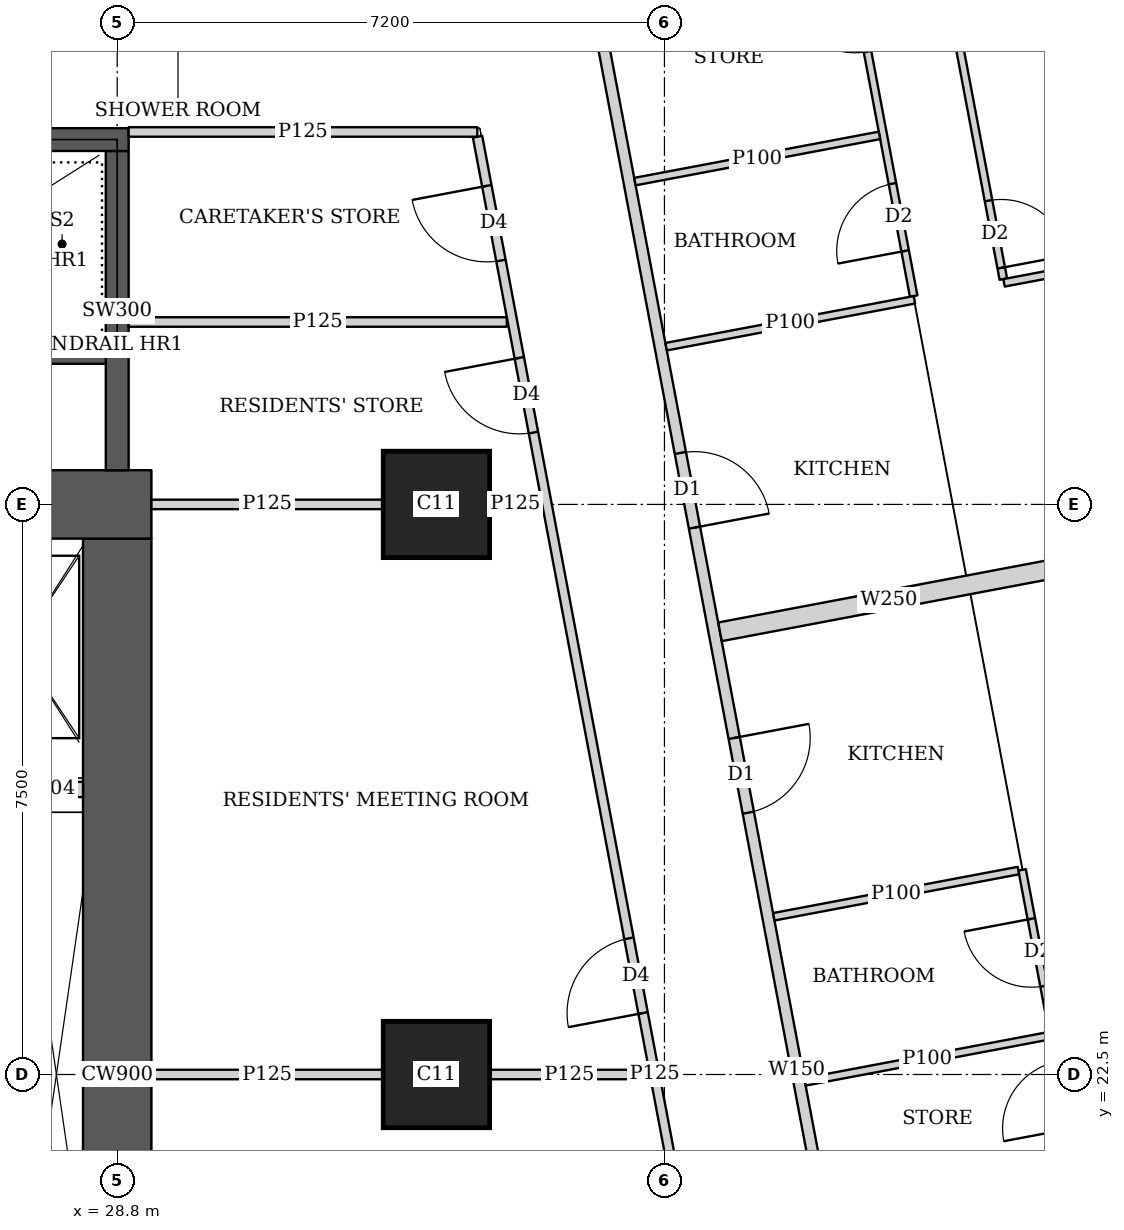
"""IFC4 building model, lengths in metres.
Left out: names, types, materials, properties, quantities, classifications, styles, units other than length and angle.
Written with IfcOpenShell. Run it as: python <this file> out.ifc"""

import sys

from ifc_helpers import new_model, si_unit, direction, frame, frame_2d, origin, origin_2d, place, context, subcontext, project, spatial, rectangle, extrude, element, fill, save


model = new_model("IFC4")
c1 = context("Model", 3, precision=1e-05, world=origin(), true_north=direction((0.0, 1.0)))
c2 = subcontext(c1, "Body", "Model", "MODEL_VIEW")
j1 = project(units=[si_unit("LENGTHUNIT", "METRE"), si_unit("PLANEANGLEUNIT", "RADIAN")], contexts=[c1])
p1 = place(None, origin())
s1 = spatial("IfcSite", under=j1, at=p1, CompositionType="ELEMENT")
p2 = place(p1, origin())
s2 = spatial("IfcBuilding", under=s1, at=p2, CompositionType="ELEMENT")
p3 = place(p2, frame((0.0, 0.0, 234.95)))
s3 = spatial("IfcBuildingStorey", under=s2, at=p3, CompositionType="ELEMENT", Elevation=234.95)
for number, where, z_axis, x_axis in (
    (1, (33.0, 22.5, 0.0), (0.0, 0.0, 1.0), (1.0, 0.0, 0.0)),
    (2, (33.0, 30.0, 0.0), (0.0, 0.0, 1.0), (1.0, 0.0, 0.0)),
):
    element("IfcColumn", number, at=place(p3, frame(where, z_axis=z_axis, x_axis=x_axis)), inside=s3, PredefinedType="COLUMN", context=c2, shape_type="SweptSolid", body=[
        extrude(rectangle(XDim=1.4, YDim=1.4, at=origin_2d()), origin(), (0.0, 0.0, 1.0), 3.75),
    ])
p4 = place(p3, frame((13.95, 30.0, 0.0), z_axis=(0.0, 0.0, 1.0), x_axis=(1.0, 0.0, 0.0)))
e3 = element("IfcWall", 3, at=p4, inside=s3, PredefinedType="SHEAR", context=c2, shape_type="SweptSolid", body=[
    extrude(rectangle(XDim=15.3, YDim=0.9, at=frame_2d((7.65, 0.0))), origin(), (0.0, 0.0, 1.0), 3.75),
])
p5 = place(p4, frame((4.45, 0.0, 0.0)))
e4 = element("IfcOpeningElement", 4, at=p5, cuts=e3, PredefinedType="OPENING", context=c2, shape_type="SweptSolid", body=[
    extrude(rectangle(XDim=1.8, YDim=2.1, at=frame_2d((0.9, 1.05))), frame((0.0, 0.46, 0.0), z_axis=(0.0, -1.0, 0.0), x_axis=(1.0, 0.0, 0.0)), (0.0, 0.0, 1.0), 0.92),
])
p6 = place(p4, frame((10.7, 0.0, 0.0)))
e5 = element("IfcOpeningElement", 5, at=p6, cuts=e3, PredefinedType="OPENING", context=c2, shape_type="SweptSolid", body=[
    extrude(rectangle(XDim=1.1, YDim=2.1, at=frame_2d((0.55, 1.05))), frame((0.0, 0.46, 0.0), z_axis=(0.0, -1.0, 0.0), x_axis=(1.0, 0.0, 0.0)), (0.0, 0.0, 1.0), 0.92),
])
p7 = place(p3, frame((28.8, 15.45, 0.0), z_axis=(0.0, 0.0, 1.0), x_axis=(0.0, 1.0, 0.0)))
e6 = element("IfcWall", 6, at=p7, inside=s3, PredefinedType="SHEAR", context=c2, shape_type="SweptSolid", body=[
    extrude(rectangle(XDim=14.1, YDim=0.9, at=frame_2d((7.05, 0.0))), origin(), (0.0, 0.0, 1.0), 3.75),
])
p8 = place(p3, frame((21.45, 34.8, 0.0), z_axis=(0.0, 0.0, 1.0), x_axis=(1.0, 0.0, 0.0)))
e7 = element("IfcWall", 7, at=p8, inside=s3, PredefinedType="SHEAR", context=c2, shape_type="SweptSolid", body=[
    extrude(rectangle(XDim=7.5, YDim=0.3, at=frame_2d((3.75, 0.0))), origin(), (0.0, 0.0, 1.0), 3.75),
])
p9 = place(p8, frame((0.5, 0.0, 0.0)))
e8 = element("IfcOpeningElement", 8, at=p9, cuts=e7, PredefinedType="OPENING", context=c2, shape_type="SweptSolid", body=[
    extrude(rectangle(XDim=1.1, YDim=2.1, at=frame_2d((0.55, 1.05))), frame((0.0, 0.16, 0.0), z_axis=(0.0, -1.0, 0.0), x_axis=(1.0, 0.0, 0.0)), (0.0, 0.0, 1.0), 0.32),
])
p10 = place(p3, frame((28.8, 30.45, 0.0), z_axis=(0.0, 0.0, 1.0), x_axis=(0.0, 1.0, 0.0)))
e9 = element("IfcWall", 9, at=p10, inside=s3, PredefinedType="SHEAR", context=c2, shape_type="SweptSolid", body=[
    extrude(rectangle(XDim=4.2, YDim=0.3, at=frame_2d((2.1, 0.0))), origin(), (0.0, 0.0, 1.0), 3.75),
])
p11 = place(p3, frame((33.933, 42.73, 0.0), z_axis=(0.0, 0.0, 1.0), x_axis=(0.185595417643, -0.982626246825, 0.0)))
e10 = element("IfcWall", 10, at=p11, inside=s3, PredefinedType="SOLIDWALL", context=c2, shape_type="SweptSolid", body=[
    extrude(rectangle(XDim=41.051, YDim=0.15, at=frame_2d((20.525, 0.0))), origin(), (0.0, 0.0, 1.0), 2.5),
])
p12 = place(p11, frame((12.266, 0.0, 0.0)))
e11 = element("IfcOpeningElement", 11, at=p12, cuts=e10, PredefinedType="OPENING", context=c2, shape_type="SweptSolid", body=[
    extrude(rectangle(XDim=1.0, YDim=2.1, at=frame_2d((0.5, 1.05))), frame((0.0, 0.085, 0.0), z_axis=(0.0, -1.0, 0.0), x_axis=(1.0, 0.0, 0.0)), (0.0, 0.0, 1.0), 0.17),
])
p13 = place(p11, frame((16.082, 0.0, 0.0)))
e12 = element("IfcOpeningElement", 12, at=p13, cuts=e10, PredefinedType="OPENING", context=c2, shape_type="SweptSolid", body=[
    extrude(rectangle(XDim=1.0, YDim=2.1, at=frame_2d((0.5, 1.05))), frame((0.0, 0.085, 0.0), z_axis=(0.0, -1.0, 0.0), x_axis=(1.0, 0.0, 0.0)), (0.0, 0.0, 1.0), 0.17),
])
p14 = place(p11, frame((30.862, 0.0, 0.0)))
e13 = element("IfcOpeningElement", 13, at=p14, cuts=e10, PredefinedType="OPENING", context=c2, shape_type="SweptSolid", body=[
    extrude(rectangle(XDim=1.0, YDim=2.1, at=frame_2d((0.5, 1.05))), frame((0.0, 0.085, 0.0), z_axis=(0.0, -1.0, 0.0), x_axis=(1.0, 0.0, 0.0)), (0.0, 0.0, 1.0), 0.17),
])
p15 = place(p3, frame((38.764, 41.941, 0.0), z_axis=(0.0, 0.0, 1.0), x_axis=(0.185548572312, -0.982635093671, 0.0)))
e14 = element("IfcWall", 14, at=p15, inside=s3, PredefinedType="PARTITIONING", context=c2, shape_type="SweptSolid", body=[
    extrude(rectangle(XDim=9.135, YDim=0.1, at=frame_2d((4.568, 0.0))), origin(), (0.0, 0.0, 1.0), 3.5),
])
p16 = place(p15, frame((8.085, 0.0, 0.0)))
e15 = element("IfcOpeningElement", 15, at=p16, cuts=e14, PredefinedType="OPENING", context=c2, shape_type="SweptSolid", body=[
    extrude(rectangle(XDim=0.9, YDim=2.1, at=frame_2d((0.45, 1.05))), frame((0.0, 0.06, 0.0), z_axis=(0.0, -1.0, 0.0), x_axis=(1.0, 0.0, 0.0)), (0.0, 0.0, 1.0), 0.12),
])
p17 = place(p15, frame((3.7, 0.0, 0.0)))
e16 = element("IfcOpeningElement", 16, at=p17, cuts=e14, PredefinedType="OPENING", context=c2, shape_type="SweptSolid", body=[
    extrude(rectangle(XDim=0.9, YDim=2.1, at=frame_2d((0.45, 1.05))), frame((0.0, 0.06, 0.0), z_axis=(0.0, -1.0, 0.0), x_axis=(1.0, 0.0, 0.0)), (0.0, 0.0, 1.0), 0.12),
])
p18 = place(p3, frame((37.473, 42.309, 0.0), z_axis=(0.0, 0.0, 1.0), x_axis=(0.185491912953, -0.982645790827, 0.0)))
e17 = element("IfcWall", 17, at=p18, inside=s3, PredefinedType="PARTITIONING", context=c2, shape_type="SweptSolid", body=[
    extrude(rectangle(XDim=9.737, YDim=0.1, at=frame_2d((4.869, 0.0))), origin(), (0.0, 0.0, 1.0), 3.5),
])
p19 = place(p18, frame((8.232, 0.0, 0.0)))
e18 = element("IfcOpeningElement", 18, at=p19, cuts=e17, PredefinedType="OPENING", context=c2, shape_type="SweptSolid", body=[
    extrude(rectangle(XDim=0.9, YDim=2.1, at=frame_2d((0.45, 1.05))), frame((0.0, 0.06, 0.0), z_axis=(0.0, -1.0, 0.0), x_axis=(1.0, 0.0, 0.0)), (0.0, 0.0, 1.0), 0.12),
])
p20 = place(p18, frame((2.853, 0.0, 0.0)))
e19 = element("IfcOpeningElement", 19, at=p20, cuts=e17, PredefinedType="OPENING", context=c2, shape_type="SweptSolid", body=[
    extrude(rectangle(XDim=0.9, YDim=2.1, at=frame_2d((0.45, 1.05))), frame((0.0, 0.06, 0.0), z_axis=(0.0, -1.0, 0.0), x_axis=(1.0, 0.0, 0.0)), (0.0, 0.0, 1.0), 0.12),
])
p21 = place(p18, frame((5.564, 0.0, 0.0)))
e20 = element("IfcOpeningElement", 20, at=p21, cuts=e17, PredefinedType="OPENING", context=c2, shape_type="SweptSolid", body=[
    extrude(rectangle(XDim=0.9, YDim=2.1, at=frame_2d((0.45, 1.05))), frame((0.0, 0.06, 0.0), z_axis=(0.0, -1.0, 0.0), x_axis=(1.0, 0.0, 0.0)), (0.0, 0.0, 1.0), 0.12),
])
p22 = place(p3, frame((44.693, 33.713, 0.0), z_axis=(0.0, 0.0, 1.0), x_axis=(-0.982633535512, -0.185556823879, 0.0)))
e21 = element("IfcWall", 21, at=p22, inside=s3, PredefinedType="PARTITIONING", context=c2, shape_type="SweptSolid", body=[
    extrude(rectangle(XDim=4.3, YDim=0.1, at=frame_2d((2.15, 0.0))), origin(), (0.0, 0.0, 1.0), 2.05),
])
p23 = place(p3, frame((39.289, 32.692, 0.0), z_axis=(0.0, 0.0, 1.0), x_axis=(-0.982633623707, -0.185556356831, 0.0)))
e22 = element("IfcWall", 22, at=p23, inside=s3, PredefinedType="PARTITIONING", context=c2, shape_type="SweptSolid", body=[
    extrude(rectangle(XDim=3.325, YDim=0.1, at=frame_2d((1.663, 0.0))), origin(), (0.0, 0.0, 1.0), 3.5),
])
p24 = place(p3, frame((38.829, 34.855, 0.0), z_axis=(0.0, 0.0, 1.0), x_axis=(-0.982610347627, -0.185679575441, 0.0)))
e23 = element("IfcWall", 23, at=p24, inside=s3, PredefinedType="PARTITIONING", context=c2, shape_type="SweptSolid", body=[
    extrude(rectangle(XDim=3.274, YDim=0.1, at=frame_2d((1.637, 0.0))), origin(), (0.0, 0.0, 1.0), 3.5),
])
p25 = place(p3, frame((40.706, 25.192, 0.0), z_axis=(0.0, 0.0, 1.0), x_axis=(0.185629824463, -0.982619747547, 0.0)))
e24 = element("IfcWall", 24, at=p25, inside=s3, PredefinedType="PARTITIONING", context=c2, shape_type="SweptSolid", body=[
    extrude(rectangle(XDim=9.659, YDim=0.1, at=frame_2d((4.83, 0.0))), origin(), (0.0, 0.0, 1.0), 2.5),
])
p26 = place(p25, frame((0.655, 0.0, 0.0)))
e25 = element("IfcOpeningElement", 25, at=p26, cuts=e24, PredefinedType="OPENING", context=c2, shape_type="SweptSolid", body=[
    extrude(rectangle(XDim=0.9, YDim=2.1, at=frame_2d((0.45, 1.05))), frame((0.0, 0.06, 0.0), z_axis=(0.0, -1.0, 0.0), x_axis=(1.0, 0.0, 0.0)), (0.0, 0.0, 1.0), 0.12),
])
p27 = place(p25, frame((4.166, 0.0, 0.0)))
e26 = element("IfcOpeningElement", 26, at=p27, cuts=e24, PredefinedType="OPENING", context=c2, shape_type="SweptSolid", body=[
    extrude(rectangle(XDim=0.9, YDim=2.1, at=frame_2d((0.45, 1.05))), frame((0.0, 0.06, 0.0), z_axis=(0.0, -1.0, 0.0), x_axis=(1.0, 0.0, 0.0)), (0.0, 0.0, 1.0), 0.12),
])
p28 = place(p25, frame((2.563, 0.0, 0.0)))
e27 = element("IfcOpeningElement", 27, at=p28, cuts=e24, PredefinedType="OPENING", context=c2, shape_type="SweptSolid", body=[
    extrude(rectangle(XDim=0.9, YDim=2.1, at=frame_2d((0.45, 1.05))), frame((0.0, 0.06, 0.0), z_axis=(0.0, -1.0, 0.0), x_axis=(1.0, 0.0, 0.0)), (0.0, 0.0, 1.0), 0.12),
])
p29 = place(p25, frame((6.074, 0.0, 0.0)))
e28 = element("IfcOpeningElement", 28, at=p29, cuts=e24, PredefinedType="OPENING", context=c2, shape_type="SweptSolid", body=[
    extrude(rectangle(XDim=0.9, YDim=2.1, at=frame_2d((0.45, 1.05))), frame((0.0, 0.06, 0.0), z_axis=(0.0, -1.0, 0.0), x_axis=(1.0, 0.0, 0.0)), (0.0, 0.0, 1.0), 0.12),
])
p30 = place(p3, frame((40.657, 25.183, 0.0), z_axis=(0.0, 0.0, 1.0), x_axis=(-0.982607026909, -0.185697147715, 0.0)))
e29 = element("IfcWall", 29, at=p30, inside=s3, PredefinedType="PARTITIONING", context=c2, shape_type="SweptSolid", body=[
    extrude(rectangle(XDim=3.275, YDim=0.1, at=frame_2d((1.637, 0.0))), origin(), (0.0, 0.0, 1.0), 3.5),
])
p31 = place(p3, frame((41.067, 23.011, 0.0), z_axis=(0.0, 0.0, 1.0), x_axis=(-0.982618057925, -0.185638768151, 0.0)))
e30 = element("IfcWall", 30, at=p31, inside=s3, PredefinedType="PARTITIONING", context=c2, shape_type="SweptSolid", body=[
    extrude(rectangle(XDim=3.275, YDim=0.1, at=frame_2d((1.637, 0.0))), origin(), (0.0, 0.0, 1.0), 2.5),
])
p32 = place(p3, frame((41.177, 29.164, 0.0), z_axis=(0.0, 0.0, 1.0), x_axis=(-0.982612837616, -0.185666398014, 0.0)))
e31 = element("IfcWall", 31, at=p32, inside=s3, PredefinedType="SOLIDWALL", context=c2, shape_type="SweptSolid", body=[
    extrude(rectangle(XDim=4.525, YDim=0.25, at=frame_2d((2.262, 0.0))), origin(), (0.0, 0.0, 1.0), 2.5),
])
p33 = place(p3, frame((28.95, 34.9, 0.0), z_axis=(0.0, 0.0, 1.0), x_axis=(1.0, 0.0, 0.0)))
e32 = element("IfcWall", 32, at=p33, inside=s3, PredefinedType="PARTITIONING", context=c2, shape_type="SweptSolid", body=[
    extrude(rectangle(XDim=4.588, YDim=0.125, at=frame_2d((2.294, 0.0))), origin(), (0.0, 0.0, 1.0), 3.5),
])
p34 = place(p3, frame((38.202, 10.163, 0.0), z_axis=(0.0, 0.0, 1.0), x_axis=(-0.185610321132, 0.982623431783, 0.0)))
e33 = element("IfcWall", 33, at=p34, inside=s3, PredefinedType="PARTITIONING", context=c2, shape_type="SweptSolid", body=[
    extrude(rectangle(XDim=25.111, YDim=0.125, at=frame_2d((12.556, 0.0))), origin(), (0.0, 0.0, 1.0), 2.5),
])
p35 = place(p34, frame((0.708, 0.0, 0.0)))
e34 = element("IfcOpeningElement", 34, at=p35, cuts=e33, PredefinedType="OPENING", context=c2, shape_type="SweptSolid", body=[
    extrude(rectangle(XDim=1.0, YDim=2.1, at=frame_2d((0.5, 1.05))), frame((0.0, 0.073, 0.0), z_axis=(0.0, -1.0, 0.0), x_axis=(1.0, 0.0, 0.0)), (0.0, 0.0, 1.0), 0.145),
])
p36 = place(p34, frame((13.378, 0.0, 0.0)))
e35 = element("IfcOpeningElement", 35, at=p36, cuts=e33, PredefinedType="OPENING", context=c2, shape_type="SweptSolid", body=[
    extrude(rectangle(XDim=1.0, YDim=2.1, at=frame_2d((0.5, 1.05))), frame((0.0, 0.073, 0.0), z_axis=(0.0, -1.0, 0.0), x_axis=(1.0, 0.0, 0.0)), (0.0, 0.0, 1.0), 0.145),
])
p37 = place(p34, frame((21.15, 0.0, 0.0)))
e36 = element("IfcOpeningElement", 36, at=p37, cuts=e33, PredefinedType="OPENING", context=c2, shape_type="SweptSolid", body=[
    extrude(rectangle(XDim=1.0, YDim=2.1, at=frame_2d((0.5, 1.05))), frame((0.0, 0.073, 0.0), z_axis=(0.0, -1.0, 0.0), x_axis=(1.0, 0.0, 0.0)), (0.0, 0.0, 1.0), 0.145),
])
p38 = place(p34, frame((23.453, 0.0, 0.0)))
e37 = element("IfcOpeningElement", 37, at=p38, cuts=e33, PredefinedType="OPENING", context=c2, shape_type="SweptSolid", body=[
    extrude(rectangle(XDim=1.0, YDim=2.1, at=frame_2d((0.5, 1.05))), frame((0.0, 0.073, 0.0), z_axis=(0.0, -1.0, 0.0), x_axis=(1.0, 0.0, 0.0)), (0.0, 0.0, 1.0), 0.145),
])
p39 = place(p3, frame((29.25, 22.5, 0.0), z_axis=(0.0, 0.0, 1.0), x_axis=(1.0, 0.0, 0.0)))
e38 = element("IfcWall", 38, at=p39, inside=s3, PredefinedType="PARTITIONING", context=c2, shape_type="SweptSolid", body=[
    extrude(rectangle(XDim=3.049, YDim=0.125, at=frame_2d((1.524, 0.0))), origin(), (0.0, 0.0, 1.0), 3.5),
])
p40 = place(p3, frame((33.701, 22.5, 0.0), z_axis=(0.0, 0.0, 1.0), x_axis=(1.0, 0.0, 0.0)))
e39 = element("IfcWall", 39, at=p40, inside=s3, PredefinedType="PARTITIONING", context=c2, shape_type="SweptSolid", body=[
    extrude(rectangle(XDim=2.095, YDim=0.125, at=frame_2d((1.047, 0.0))), origin(), (0.0, 0.0, 1.0), 2.5),
])
p41 = place(p3, frame((29.25, 30.0, 0.0), z_axis=(0.0, 0.0, 1.0), x_axis=(1.0, 0.0, 0.0)))
e40 = element("IfcWall", 40, at=p41, inside=s3, PredefinedType="PARTITIONING", context=c2, shape_type="SweptSolid", body=[
    extrude(rectangle(XDim=3.049, YDim=0.125, at=frame_2d((1.524, 0.0))), origin(), (0.0, 0.0, 1.0), 3.5),
])
p42 = place(p3, frame((33.701, 30.0, 0.0), z_axis=(0.0, 0.0, 1.0), x_axis=(1.0, 0.0, 0.0)))
e41 = element("IfcWall", 41, at=p42, inside=s3, PredefinedType="PARTITIONING", context=c2, shape_type="SweptSolid", body=[
    extrude(rectangle(XDim=0.678, YDim=0.125, at=frame_2d((0.339, 0.0))), origin(), (0.0, 0.0, 1.0), 2.5),
])
p43 = place(p3, frame((28.95, 32.4, 0.0), z_axis=(0.0, 0.0, 1.0), x_axis=(1.0, 0.0, 0.0)))
e42 = element("IfcWall", 42, at=p43, inside=s3, PredefinedType="PARTITIONING", context=c2, shape_type="SweptSolid", body=[
    extrude(rectangle(XDim=4.976, YDim=0.125, at=frame_2d((2.488, 0.0))), origin(), (0.0, 0.0, 1.0), 3.5),
])
p44 = place(p3, frame((23.0, 31.95, 0.0), z_axis=(0.0, 0.0, 1.0), x_axis=(1.0, 0.0, 0.0)))
e43 = element("IfcWall", 43, at=p44, inside=s3, PredefinedType="SHEAR", context=c2, shape_type="SweptSolid", body=[
    extrude(rectangle(XDim=5.8, YDim=0.2, at=frame_2d((2.9, 0.0))), origin(), (0.0, 0.0, 1.0), 3.75),
])
p45 = place(p3, frame((27.4, 26.25, 0.0), z_axis=(0.0, 0.0, 1.0), x_axis=(1.0, 0.0, 0.0)))
e44 = element("IfcWall", 44, at=p45, inside=s3, PredefinedType="SOLIDWALL", context=c2, shape_type="SweptSolid", body=[
    extrude(rectangle(XDim=0.95, YDim=0.2, at=frame_2d((0.475, 0.0))), origin(), (0.0, 0.0, 1.0), 3.5),
])
p46 = place(p16, origin())
e45 = element("IfcDoor", 45, at=p46, inside=s3, OperationType="SINGLE_SWING_RIGHT", PredefinedType="DOOR", context=c2, shape_type="SweptSolid", body=[
    extrude(rectangle(XDim=0.9, YDim=2.1, at=frame_2d((0.45, 1.05))), frame((0.0, 0.025, 0.0), z_axis=(0.0, -1.0, 0.0), x_axis=(1.0, 0.0, 0.0)), (0.0, 0.0, 1.0), 0.05),
])
fill(e15, e45)
p47 = place(p19, origin())
e46 = element("IfcDoor", 46, at=p47, inside=s3, OperationType="SINGLE_SWING_LEFT", PredefinedType="DOOR", context=c2, shape_type="SweptSolid", body=[
    extrude(rectangle(XDim=0.9, YDim=2.1, at=frame_2d((0.45, 1.05))), frame((0.0, 0.025, 0.0), z_axis=(0.0, -1.0, 0.0), x_axis=(1.0, 0.0, 0.0)), (0.0, 0.0, 1.0), 0.05),
])
fill(e18, e46)
p48 = place(p12, origin())
e47 = element("IfcDoor", 47, at=p48, inside=s3, OperationType="SINGLE_SWING_RIGHT", PredefinedType="DOOR", context=c2, shape_type="SweptSolid", body=[
    extrude(rectangle(XDim=1.0, YDim=2.1, at=frame_2d((0.5, 1.05))), frame((0.0, 0.025, 0.0), z_axis=(0.0, -1.0, 0.0), x_axis=(1.0, 0.0, 0.0)), (0.0, 0.0, 1.0), 0.05),
])
fill(e11, e47)
p49 = place(p26, origin())
e48 = element("IfcDoor", 48, at=p49, inside=s3, OperationType="SINGLE_SWING_RIGHT", PredefinedType="DOOR", context=c2, shape_type="SweptSolid", body=[
    extrude(rectangle(XDim=0.9, YDim=2.1, at=frame_2d((0.45, 1.05))), frame((0.0, 0.025, 0.0), z_axis=(0.0, -1.0, 0.0), x_axis=(1.0, 0.0, 0.0)), (0.0, 0.0, 1.0), 0.05),
])
fill(e25, e48)
p50 = place(p13, origin())
e49 = element("IfcDoor", 49, at=p50, inside=s3, OperationType="SINGLE_SWING_LEFT", PredefinedType="DOOR", context=c2, shape_type="SweptSolid", body=[
    extrude(rectangle(XDim=1.0, YDim=2.1, at=frame_2d((0.5, 1.05))), frame((0.0, 0.025, 0.0), z_axis=(0.0, -1.0, 0.0), x_axis=(1.0, 0.0, 0.0)), (0.0, 0.0, 1.0), 0.05),
])
fill(e12, e49)
p51 = place(p36, origin())
e50 = element("IfcDoor", 50, at=p51, inside=s3, OperationType="SINGLE_SWING_LEFT", PredefinedType="DOOR", context=c2, shape_type="SweptSolid", body=[
    extrude(rectangle(XDim=1.0, YDim=2.1, at=frame_2d((0.5, 1.05))), frame((0.0, 0.025, 0.0), z_axis=(0.0, -1.0, 0.0), x_axis=(1.0, 0.0, 0.0)), (0.0, 0.0, 1.0), 0.05),
])
fill(e35, e50)
p52 = place(p37, origin())
e51 = element("IfcDoor", 51, at=p52, inside=s3, OperationType="SINGLE_SWING_RIGHT", PredefinedType="DOOR", context=c2, shape_type="SweptSolid", body=[
    extrude(rectangle(XDim=1.0, YDim=2.1, at=frame_2d((0.5, 1.05))), frame((0.0, 0.025, 0.0), z_axis=(0.0, -1.0, 0.0), x_axis=(1.0, 0.0, 0.0)), (0.0, 0.0, 1.0), 0.05),
])
fill(e36, e51)
p53 = place(p38, origin())
e52 = element("IfcDoor", 52, at=p53, inside=s3, OperationType="SINGLE_SWING_RIGHT", PredefinedType="DOOR", context=c2, shape_type="SweptSolid", body=[
    extrude(rectangle(XDim=1.0, YDim=2.1, at=frame_2d((0.5, 1.05))), frame((0.0, 0.025, 0.0), z_axis=(0.0, -1.0, 0.0), x_axis=(1.0, 0.0, 0.0)), (0.0, 0.0, 1.0), 0.05),
])
fill(e37, e52)
save(model, sys.argv[1])
